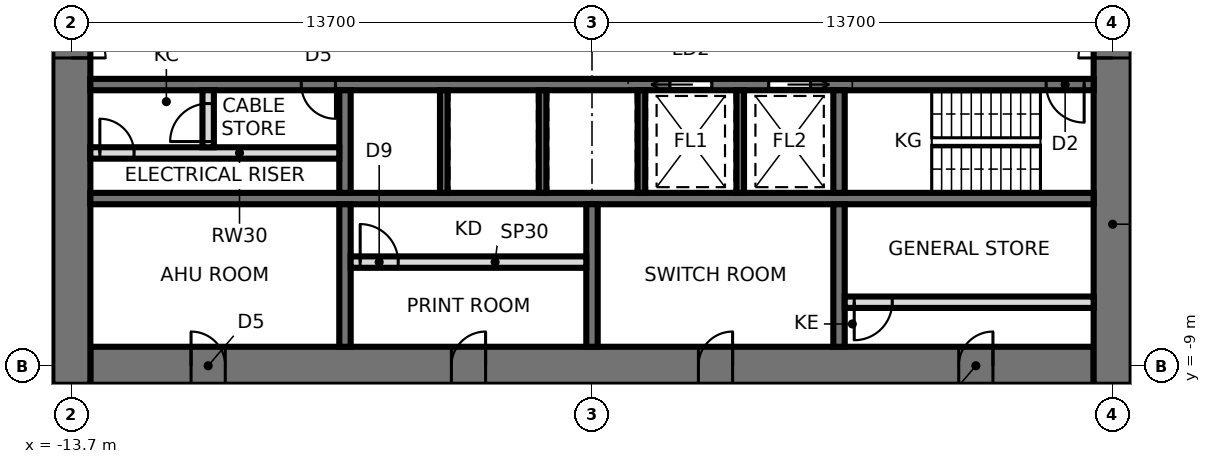
"""IFC4 building model, lengths in metres.
Left out: names, types, materials, properties, quantities, classifications, styles, units other than length and angle.
Written with IfcOpenShell. Run it as: python <this file> out.ifc"""

import sys

from ifc_helpers import new_model, si_unit, direction, frame, frame_2d, origin, place, context, subcontext, project, spatial, rectangle, extrude, element, fill, save


model = new_model("IFC4")
c1 = context("Model", 3, precision=1e-05, world=origin(), true_north=direction((0.0, 1.0)))
c2 = subcontext(c1, "Body", "Model", "MODEL_VIEW")
j1 = project(units=[si_unit("LENGTHUNIT", "METRE"), si_unit("PLANEANGLEUNIT", "RADIAN")], contexts=[c1])
p1 = place(None, origin())
s1 = spatial("IfcSite", under=j1, at=p1, CompositionType="ELEMENT")
p2 = place(p1, origin())
s2 = spatial("IfcBuilding", under=s1, at=p2, CompositionType="ELEMENT")
p3 = place(p2, frame((0.0, 0.0, 44.8)))
s3 = spatial("IfcBuildingStorey", under=s2, at=p3, CompositionType="ELEMENT", Elevation=44.8)
p4 = place(p3, frame((-13.2, -9.0, 0.0), z_axis=(0.0, 0.0, 1.0), x_axis=(1.0, 0.0, 0.0)))
e1 = element("IfcWall", 1, at=p4, inside=s3, PredefinedType="SHEAR", context=c2, shape_type="SweptSolid", body=[
    extrude(rectangle(XDim=26.4, YDim=1.0, at=frame_2d((13.2, 0.0))), origin(), (0.0, 0.0, 1.0), 4.2),
])
p5 = place(p4, frame((2.65, 0.0, 0.0)))
e2 = element("IfcOpeningElement", 2, at=p5, cuts=e1, PredefinedType="OPENING", context=c2, shape_type="SweptSolid", body=[
    extrude(rectangle(XDim=0.9, YDim=2.1, at=frame_2d((0.45, 1.05))), frame((0.0, 0.51, 0.0), z_axis=(0.0, -1.0, 0.0), x_axis=(1.0, 0.0, 0.0)), (0.0, 0.0, 1.0), 1.02),
])
p6 = place(p4, frame((9.5, 0.0, 0.0)))
e3 = element("IfcOpeningElement", 3, at=p6, cuts=e1, PredefinedType="OPENING", context=c2, shape_type="SweptSolid", body=[
    extrude(rectangle(XDim=0.9, YDim=2.1, at=frame_2d((0.45, 1.05))), frame((0.0, 0.51, 0.0), z_axis=(0.0, -1.0, 0.0), x_axis=(1.0, 0.0, 0.0)), (0.0, 0.0, 1.0), 1.02),
])
p7 = place(p4, frame((16.0, 0.0, 0.0)))
e4 = element("IfcOpeningElement", 4, at=p7, cuts=e1, PredefinedType="OPENING", context=c2, shape_type="SweptSolid", body=[
    extrude(rectangle(XDim=0.9, YDim=2.1, at=frame_2d((0.45, 1.05))), frame((0.0, 0.51, 0.0), z_axis=(0.0, -1.0, 0.0), x_axis=(1.0, 0.0, 0.0)), (0.0, 0.0, 1.0), 1.02),
])
p8 = place(p4, frame((22.85, 0.0, 0.0)))
e5 = element("IfcOpeningElement", 5, at=p8, cuts=e1, PredefinedType="OPENING", context=c2, shape_type="SweptSolid", body=[
    extrude(rectangle(XDim=0.9, YDim=2.1, at=frame_2d((0.45, 1.05))), frame((0.0, 0.51, 0.0), z_axis=(0.0, -1.0, 0.0), x_axis=(1.0, 0.0, 0.0)), (0.0, 0.0, 1.0), 1.02),
])
p9 = place(p3, frame((13.7, -9.5, 0.0), z_axis=(0.0, 0.0, 1.0), x_axis=(0.0, 1.0, 0.0)))
e6 = element("IfcWall", 6, at=p9, inside=s3, PredefinedType="SHEAR", context=c2, shape_type="SweptSolid", body=[
    extrude(rectangle(XDim=19.0, YDim=1.0, at=frame_2d((9.5, 0.0))), origin(), (0.0, 0.0, 1.0), 4.2),
])
p10 = place(p9, frame((8.6, 0.0, 0.0)))
e7 = element("IfcOpeningElement", 7, at=p10, cuts=e6, PredefinedType="OPENING", context=c2, shape_type="SweptSolid", body=[
    extrude(rectangle(XDim=1.8, YDim=2.4, at=frame_2d((0.9, 1.2))), frame((0.0, 0.51, 0.0), z_axis=(0.0, -1.0, 0.0), x_axis=(1.0, 0.0, 0.0)), (0.0, 0.0, 1.0), 1.02),
])
p11 = place(p3, frame((-13.7, 9.5, 0.0), z_axis=(0.0, 0.0, 1.0), x_axis=(0.0, -1.0, 0.0)))
e8 = element("IfcWall", 8, at=p11, inside=s3, PredefinedType="SHEAR", context=c2, shape_type="SweptSolid", body=[
    extrude(rectangle(XDim=19.0, YDim=1.0, at=frame_2d((9.5, 0.0))), origin(), (0.0, 0.0, 1.0), 4.2),
])
p12 = place(p11, frame((8.6, 0.0, 0.0)))
e9 = element("IfcOpeningElement", 9, at=p12, cuts=e8, PredefinedType="OPENING", context=c2, shape_type="SweptSolid", body=[
    extrude(rectangle(XDim=1.8, YDim=2.4, at=frame_2d((0.9, 1.2))), frame((0.0, 0.51, 0.0), z_axis=(0.0, -1.0, 0.0), x_axis=(1.0, 0.0, 0.0)), (0.0, 0.0, 1.0), 1.02),
])
p13 = place(p3, frame((-13.2, -1.6, 0.0), z_axis=(0.0, 0.0, 1.0), x_axis=(1.0, 0.0, 0.0)))
e10 = element("IfcWall", 10, at=p13, inside=s3, PredefinedType="SHEAR", context=c2, shape_type="SweptSolid", body=[
    extrude(rectangle(XDim=26.4, YDim=0.3, at=frame_2d((13.2, 0.0))), origin(), (0.0, 0.0, 1.0), 4.2),
])
p14 = place(p13, frame((25.15, 0.0, 0.0)))
e11 = element("IfcOpeningElement", 11, at=p14, cuts=e10, PredefinedType="OPENING", context=c2, shape_type="SweptSolid", body=[
    extrude(rectangle(XDim=1.0, YDim=2.1, at=frame_2d((0.5, 1.05))), frame((0.0, 0.16, 0.0), z_axis=(0.0, -1.0, 0.0), x_axis=(1.0, 0.0, 0.0)), (0.0, 0.0, 1.0), 0.32),
])
p15 = place(p13, frame((15.25, 0.0, 0.0)))
e12 = element("IfcOpeningElement", 12, at=p15, cuts=e10, PredefinedType="OPENING", context=c2, shape_type="SweptSolid", body=[
    extrude(rectangle(XDim=1.1, YDim=2.3, at=frame_2d((0.55, 1.15))), frame((0.0, 0.16, 0.0), z_axis=(0.0, -1.0, 0.0), x_axis=(1.0, 0.0, 0.0)), (0.0, 0.0, 1.0), 0.32),
])
p16 = place(p13, frame((17.85, 0.0, 0.0)))
e13 = element("IfcOpeningElement", 13, at=p16, cuts=e10, PredefinedType="OPENING", context=c2, shape_type="SweptSolid", body=[
    extrude(rectangle(XDim=1.1, YDim=2.3, at=frame_2d((0.55, 1.15))), frame((0.0, 0.16, 0.0), z_axis=(0.0, -1.0, 0.0), x_axis=(1.0, 0.0, 0.0)), (0.0, 0.0, 1.0), 0.32),
])
p17 = place(p13, frame((5.55, 0.0, 0.0)))
e14 = element("IfcOpeningElement", 14, at=p17, cuts=e10, PredefinedType="OPENING", context=c2, shape_type="SweptSolid", body=[
    extrude(rectangle(XDim=0.9, YDim=2.1, at=frame_2d((0.45, 1.05))), frame((0.0, 0.16, 0.0), z_axis=(0.0, -1.0, 0.0), x_axis=(1.0, 0.0, 0.0)), (0.0, 0.0, 1.0), 0.32),
])
p18 = place(p3, frame((-13.2, -4.6, 0.0), z_axis=(0.0, 0.0, 1.0), x_axis=(1.0, 0.0, 0.0)))
e15 = element("IfcWall", 15, at=p18, inside=s3, PredefinedType="SHEAR", context=c2, shape_type="SweptSolid", body=[
    extrude(rectangle(XDim=26.4, YDim=0.3, at=frame_2d((13.2, 0.0))), origin(), (0.0, 0.0, 1.0), 4.2),
])
p19 = place(p3, frame((-6.5, -1.75, 0.0), z_axis=(0.0, 0.0, 1.0), x_axis=(0.0, -1.0, 0.0)))
e16 = element("IfcWall", 16, at=p19, inside=s3, PredefinedType="SHEAR", context=c2, shape_type="SweptSolid", body=[
    extrude(rectangle(XDim=2.7, YDim=0.3, at=frame_2d((1.35, 0.0))), origin(), (0.0, 0.0, 1.0), 4.2),
])
p20 = place(p3, frame((-6.5, -4.75, 0.0), z_axis=(0.0, 0.0, 1.0), x_axis=(0.0, -1.0, 0.0)))
e17 = element("IfcWall", 17, at=p20, inside=s3, PredefinedType="SHEAR", context=c2, shape_type="SweptSolid", body=[
    extrude(rectangle(XDim=3.75, YDim=0.3, at=frame_2d((1.875, 0.0))), origin(), (0.0, 0.0, 1.0), 4.2),
])
p21 = place(p3, frame((6.5, -1.75, 0.0), z_axis=(0.0, 0.0, 1.0), x_axis=(0.0, -1.0, 0.0)))
e18 = element("IfcWall", 18, at=p21, inside=s3, PredefinedType="SHEAR", context=c2, shape_type="SweptSolid", body=[
    extrude(rectangle(XDim=2.7, YDim=0.3, at=frame_2d((1.35, 0.0))), origin(), (0.0, 0.0, 1.0), 4.2),
])
p22 = place(p3, frame((6.5, -4.75, 0.0), z_axis=(0.0, 0.0, 1.0), x_axis=(0.0, -1.0, 0.0)))
e19 = element("IfcWall", 19, at=p22, inside=s3, PredefinedType="SHEAR", context=c2, shape_type="SweptSolid", body=[
    extrude(rectangle(XDim=3.75, YDim=0.3, at=frame_2d((1.875, 0.0))), origin(), (0.0, 0.0, 1.0), 4.2),
])
for number, where, z_axis, x_axis in (
    (20, (-3.9, -1.75, 0.0), (0.0, 0.0, 1.0), (0.0, -1.0, 0.0)),
    (21, (-1.3, -1.75, 0.0), (0.0, 0.0, 1.0), (0.0, -1.0, 0.0)),
    (22, (1.3, -1.75, 0.0), (0.0, 0.0, 1.0), (0.0, -1.0, 0.0)),
    (23, (3.9, -1.75, 0.0), (0.0, 0.0, 1.0), (0.0, -1.0, 0.0)),
):
    element("IfcWall", number, at=place(p3, frame(where, z_axis=z_axis, x_axis=x_axis)), inside=s3, PredefinedType="SHEAR", context=c2, shape_type="SweptSolid", body=[
        extrude(rectangle(XDim=2.7, YDim=0.2, at=frame_2d((1.35, 0.0))), origin(), (0.0, 0.0, 1.0), 4.2),
    ])
p23 = place(p3, frame((0.0, -4.75, 0.0), z_axis=(0.0, 0.0, 1.0), x_axis=(0.0, -1.0, 0.0)))
e24 = element("IfcWall", 24, at=p23, inside=s3, PredefinedType="SHEAR", context=c2, shape_type="SweptSolid", body=[
    extrude(rectangle(XDim=3.75, YDim=0.3, at=frame_2d((1.875, 0.0))), origin(), (0.0, 0.0, 1.0), 4.2),
])
p24 = place(p3, frame((-6.35, -6.272, 0.0), z_axis=(0.0, 0.0, 1.0), x_axis=(1.0, 0.0, 0.0)))
e25 = element("IfcWall", 25, at=p24, inside=s3, PredefinedType="PARTITIONING", context=c2, shape_type="SweptSolid", body=[
    extrude(rectangle(XDim=6.2, YDim=0.3, at=frame_2d((3.1, 0.0))), origin(), (0.0, 0.0, 1.0), 4.04),
])
p25 = place(p24, frame((0.25, 0.0, 0.0)))
e26 = element("IfcOpeningElement", 26, at=p25, cuts=e25, PredefinedType="OPENING", context=c2, shape_type="SweptSolid", body=[
    extrude(rectangle(XDim=1.0, YDim=2.4, at=frame_2d((0.5, 1.2))), frame((0.0, 0.16, 0.0), z_axis=(0.0, -1.0, 0.0), x_axis=(1.0, 0.0, 0.0)), (0.0, 0.0, 1.0), 0.32),
])
p26 = place(p3, frame((6.65, -7.328, 0.0), z_axis=(0.0, 0.0, 1.0), x_axis=(1.0, 0.0, 0.0)))
e27 = element("IfcWall", 27, at=p26, inside=s3, PredefinedType="PARTITIONING", context=c2, shape_type="SweptSolid", body=[
    extrude(rectangle(XDim=6.55, YDim=0.3, at=frame_2d((3.275, 0.0))), origin(), (0.0, 0.0, 1.0), 4.04),
])
p27 = place(p26, frame((0.25, 0.0, 0.0)))
e28 = element("IfcOpeningElement", 28, at=p27, cuts=e27, PredefinedType="OPENING", context=c2, shape_type="SweptSolid", body=[
    extrude(rectangle(XDim=1.0, YDim=2.4, at=frame_2d((0.5, 1.2))), frame((0.0, 0.16, 0.0), z_axis=(0.0, -1.0, 0.0), x_axis=(1.0, 0.0, 0.0)), (0.0, 0.0, 1.0), 0.32),
])
p28 = place(p3, frame((-13.2, -3.4, 0.0), z_axis=(0.0, 0.0, 1.0), x_axis=(1.0, 0.0, 0.0)))
e29 = element("IfcWall", 29, at=p28, inside=s3, PredefinedType="SOLIDWALL", context=c2, shape_type="SweptSolid", body=[
    extrude(rectangle(XDim=6.55, YDim=0.3, at=frame_2d((3.275, 0.0))), origin(), (0.0, 0.0, 1.0), 4.04),
])
p29 = place(p28, frame((0.25, 0.0, 0.0)))
e30 = element("IfcOpeningElement", 30, at=p29, cuts=e29, PredefinedType="OPENING", context=c2, shape_type="SweptSolid", body=[
    extrude(rectangle(XDim=0.9, YDim=2.1, at=frame_2d((0.45, 1.05))), frame((0.0, 0.16, 0.0), z_axis=(0.0, -1.0, 0.0), x_axis=(1.0, 0.0, 0.0)), (0.0, 0.0, 1.0), 0.32),
])
p30 = place(p3, frame((-10.1, -3.25, 0.0), z_axis=(0.0, 0.0, 1.0), x_axis=(0.0, 1.0, 0.0)))
e31 = element("IfcWall", 31, at=p30, inside=s3, PredefinedType="PARTITIONING", context=c2, shape_type="SweptSolid", body=[
    extrude(rectangle(XDim=1.5, YDim=0.3, at=frame_2d((0.75, 0.0))), origin(), (0.0, 0.0, 1.0), 4.04),
])
p31 = place(p30, frame((0.15, 0.0, 0.0)))
e32 = element("IfcOpeningElement", 32, at=p31, cuts=e31, PredefinedType="OPENING", context=c2, shape_type="SweptSolid", body=[
    extrude(rectangle(XDim=1.0, YDim=2.4, at=frame_2d((0.5, 1.2))), frame((0.0, 0.16, 0.0), z_axis=(0.0, -1.0, 0.0), x_axis=(1.0, 0.0, 0.0)), (0.0, 0.0, 1.0), 0.32),
])
p32 = place(p12, origin())
e33 = element("IfcDoor", 33, at=p32, inside=s3, OperationType="DOUBLE_DOOR_SINGLE_SWING", PredefinedType="DOOR", context=c2, shape_type="SweptSolid", body=[
    extrude(rectangle(XDim=1.72, YDim=2.36, at=frame_2d((0.9, 1.18))), frame((0.0, 0.025, 0.0), z_axis=(0.0, -1.0, 0.0), x_axis=(1.0, 0.0, 0.0)), (0.0, 0.0, 1.0), 0.05),
    extrude(rectangle(XDim=0.04, YDim=2.4, at=frame_2d((0.02, 1.2))), frame((0.0, 0.25, 0.0), z_axis=(0.0, -1.0, 0.0), x_axis=(1.0, 0.0, 0.0)), (0.0, 0.0, 1.0), 0.5),
    extrude(rectangle(XDim=0.04, YDim=2.4, at=frame_2d((1.78, 1.2))), frame((0.0, 0.25, 0.0), z_axis=(0.0, -1.0, 0.0), x_axis=(1.0, 0.0, 0.0)), (0.0, 0.0, 1.0), 0.5),
    extrude(rectangle(XDim=1.72, YDim=0.04, at=frame_2d((0.9, 2.38))), frame((0.0, 0.25, 0.0), z_axis=(0.0, -1.0, 0.0), x_axis=(1.0, 0.0, 0.0)), (0.0, 0.0, 1.0), 0.5),
])
fill(e9, e33)
p33 = place(p10, origin())
e34 = element("IfcDoor", 34, at=p33, inside=s3, OperationType="DOUBLE_DOOR_SINGLE_SWING", PredefinedType="DOOR", context=c2, shape_type="SweptSolid", body=[
    extrude(rectangle(XDim=1.72, YDim=2.36, at=frame_2d((0.9, 1.18))), frame((0.0, 0.025, 0.0), z_axis=(0.0, -1.0, 0.0), x_axis=(1.0, 0.0, 0.0)), (0.0, 0.0, 1.0), 0.05),
    extrude(rectangle(XDim=0.04, YDim=2.4, at=frame_2d((0.02, 1.2))), frame((0.0, 0.25, 0.0), z_axis=(0.0, -1.0, 0.0), x_axis=(1.0, 0.0, 0.0)), (0.0, 0.0, 1.0), 0.5),
    extrude(rectangle(XDim=0.04, YDim=2.4, at=frame_2d((1.78, 1.2))), frame((0.0, 0.25, 0.0), z_axis=(0.0, -1.0, 0.0), x_axis=(1.0, 0.0, 0.0)), (0.0, 0.0, 1.0), 0.5),
    extrude(rectangle(XDim=1.72, YDim=0.04, at=frame_2d((0.9, 2.38))), frame((0.0, 0.25, 0.0), z_axis=(0.0, -1.0, 0.0), x_axis=(1.0, 0.0, 0.0)), (0.0, 0.0, 1.0), 0.5),
])
fill(e7, e34)
p34 = place(p14, frame((1.0, 0.0, 0.0), z_axis=(0.0, 0.0, 1.0), x_axis=(-1.0, 0.0, 0.0)))
e35 = element("IfcDoor", 35, at=p34, inside=s3, OperationType="SINGLE_SWING_LEFT", PredefinedType="DOOR", context=c2, shape_type="SweptSolid", body=[
    extrude(rectangle(XDim=1.0, YDim=2.1, at=frame_2d((0.5, 1.05))), frame((0.0, 0.025, 0.0), z_axis=(0.0, -1.0, 0.0), x_axis=(1.0, 0.0, 0.0)), (0.0, 0.0, 1.0), 0.05),
])
fill(e11, e35)
p35 = place(p15, frame((1.1, 0.0, 0.0), z_axis=(0.0, 0.0, 1.0), x_axis=(-1.0, 0.0, 0.0)))
e36 = element("IfcDoor", 36, at=p35, inside=s3, OperationType="SLIDING_TO_RIGHT", PredefinedType="DOOR", context=c2, shape_type="SweptSolid", body=[
    extrude(rectangle(XDim=1.1, YDim=2.3, at=frame_2d((0.55, 1.15))), frame((0.0, 0.025, 0.0), z_axis=(0.0, -1.0, 0.0), x_axis=(1.0, 0.0, 0.0)), (0.0, 0.0, 1.0), 0.05),
])
fill(e12, e36)
p36 = place(p16, frame((1.1, 0.0, 0.0), z_axis=(0.0, 0.0, 1.0), x_axis=(-1.0, 0.0, 0.0)))
e37 = element("IfcDoor", 37, at=p36, inside=s3, OperationType="SLIDING_TO_LEFT", PredefinedType="DOOR", context=c2, shape_type="SweptSolid", body=[
    extrude(rectangle(XDim=1.1, YDim=2.3, at=frame_2d((0.55, 1.15))), frame((0.0, 0.025, 0.0), z_axis=(0.0, -1.0, 0.0), x_axis=(1.0, 0.0, 0.0)), (0.0, 0.0, 1.0), 0.05),
])
fill(e13, e37)
p37 = place(p17, frame((0.9, 0.0, 0.0), z_axis=(0.0, 0.0, 1.0), x_axis=(-1.0, 0.0, 0.0)))
e38 = element("IfcDoor", 38, at=p37, inside=s3, OperationType="SINGLE_SWING_LEFT", PredefinedType="DOOR", context=c2, shape_type="SweptSolid", body=[
    extrude(rectangle(XDim=0.9, YDim=2.1, at=frame_2d((0.45, 1.05))), frame((0.0, 0.025, 0.0), z_axis=(0.0, -1.0, 0.0), x_axis=(1.0, 0.0, 0.0)), (0.0, 0.0, 1.0), 0.05),
])
fill(e14, e38)
p38 = place(p5, origin())
e39 = element("IfcDoor", 39, at=p38, inside=s3, OperationType="SINGLE_SWING_LEFT", PredefinedType="DOOR", context=c2, shape_type="SweptSolid", body=[
    extrude(rectangle(XDim=0.82, YDim=2.06, at=frame_2d((0.45, 1.03))), frame((0.0, 0.025, 0.0), z_axis=(0.0, -1.0, 0.0), x_axis=(1.0, 0.0, 0.0)), (0.0, 0.0, 1.0), 0.05),
    extrude(rectangle(XDim=0.04, YDim=2.1, at=frame_2d((0.02, 1.05))), frame((0.0, 0.25, 0.0), z_axis=(0.0, -1.0, 0.0), x_axis=(1.0, 0.0, 0.0)), (0.0, 0.0, 1.0), 0.5),
    extrude(rectangle(XDim=0.04, YDim=2.1, at=frame_2d((0.88, 1.05))), frame((0.0, 0.25, 0.0), z_axis=(0.0, -1.0, 0.0), x_axis=(1.0, 0.0, 0.0)), (0.0, 0.0, 1.0), 0.5),
    extrude(rectangle(XDim=0.82, YDim=0.04, at=frame_2d((0.45, 2.08))), frame((0.0, 0.25, 0.0), z_axis=(0.0, -1.0, 0.0), x_axis=(1.0, 0.0, 0.0)), (0.0, 0.0, 1.0), 0.5),
])
fill(e2, e39)
p39 = place(p6, origin())
e40 = element("IfcDoor", 40, at=p39, inside=s3, OperationType="SINGLE_SWING_RIGHT", PredefinedType="DOOR", context=c2, shape_type="SweptSolid", body=[
    extrude(rectangle(XDim=0.82, YDim=2.06, at=frame_2d((0.45, 1.03))), frame((0.0, 0.025, 0.0), z_axis=(0.0, -1.0, 0.0), x_axis=(1.0, 0.0, 0.0)), (0.0, 0.0, 1.0), 0.05),
    extrude(rectangle(XDim=0.04, YDim=2.1, at=frame_2d((0.02, 1.05))), frame((0.0, 0.25, 0.0), z_axis=(0.0, -1.0, 0.0), x_axis=(1.0, 0.0, 0.0)), (0.0, 0.0, 1.0), 0.5),
    extrude(rectangle(XDim=0.04, YDim=2.1, at=frame_2d((0.88, 1.05))), frame((0.0, 0.25, 0.0), z_axis=(0.0, -1.0, 0.0), x_axis=(1.0, 0.0, 0.0)), (0.0, 0.0, 1.0), 0.5),
    extrude(rectangle(XDim=0.82, YDim=0.04, at=frame_2d((0.45, 2.08))), frame((0.0, 0.25, 0.0), z_axis=(0.0, -1.0, 0.0), x_axis=(1.0, 0.0, 0.0)), (0.0, 0.0, 1.0), 0.5),
])
fill(e3, e40)
p40 = place(p7, origin())
e41 = element("IfcDoor", 41, at=p40, inside=s3, OperationType="SINGLE_SWING_RIGHT", PredefinedType="DOOR", context=c2, shape_type="SweptSolid", body=[
    extrude(rectangle(XDim=0.82, YDim=2.06, at=frame_2d((0.45, 1.03))), frame((0.0, 0.025, 0.0), z_axis=(0.0, -1.0, 0.0), x_axis=(1.0, 0.0, 0.0)), (0.0, 0.0, 1.0), 0.05),
    extrude(rectangle(XDim=0.04, YDim=2.1, at=frame_2d((0.02, 1.05))), frame((0.0, 0.25, 0.0), z_axis=(0.0, -1.0, 0.0), x_axis=(1.0, 0.0, 0.0)), (0.0, 0.0, 1.0), 0.5),
    extrude(rectangle(XDim=0.04, YDim=2.1, at=frame_2d((0.88, 1.05))), frame((0.0, 0.25, 0.0), z_axis=(0.0, -1.0, 0.0), x_axis=(1.0, 0.0, 0.0)), (0.0, 0.0, 1.0), 0.5),
    extrude(rectangle(XDim=0.82, YDim=0.04, at=frame_2d((0.45, 2.08))), frame((0.0, 0.25, 0.0), z_axis=(0.0, -1.0, 0.0), x_axis=(1.0, 0.0, 0.0)), (0.0, 0.0, 1.0), 0.5),
])
fill(e4, e41)
p41 = place(p8, origin())
e42 = element("IfcDoor", 42, at=p41, inside=s3, OperationType="SINGLE_SWING_RIGHT", PredefinedType="DOOR", context=c2, shape_type="SweptSolid", body=[
    extrude(rectangle(XDim=0.82, YDim=2.06, at=frame_2d((0.45, 1.03))), frame((0.0, 0.025, 0.0), z_axis=(0.0, -1.0, 0.0), x_axis=(1.0, 0.0, 0.0)), (0.0, 0.0, 1.0), 0.05),
    extrude(rectangle(XDim=0.04, YDim=2.1, at=frame_2d((0.02, 1.05))), frame((0.0, 0.25, 0.0), z_axis=(0.0, -1.0, 0.0), x_axis=(1.0, 0.0, 0.0)), (0.0, 0.0, 1.0), 0.5),
    extrude(rectangle(XDim=0.04, YDim=2.1, at=frame_2d((0.88, 1.05))), frame((0.0, 0.25, 0.0), z_axis=(0.0, -1.0, 0.0), x_axis=(1.0, 0.0, 0.0)), (0.0, 0.0, 1.0), 0.5),
    extrude(rectangle(XDim=0.82, YDim=0.04, at=frame_2d((0.45, 2.08))), frame((0.0, 0.25, 0.0), z_axis=(0.0, -1.0, 0.0), x_axis=(1.0, 0.0, 0.0)), (0.0, 0.0, 1.0), 0.5),
])
fill(e5, e42)
p42 = place(p25, origin())
e43 = element("IfcDoor", 43, at=p42, inside=s3, OperationType="SINGLE_SWING_LEFT", PredefinedType="DOOR", context=c2, shape_type="SweptSolid", body=[
    extrude(rectangle(XDim=1.0, YDim=2.4, at=frame_2d((0.5, 1.2))), frame((0.0, 0.025, 0.0), z_axis=(0.0, -1.0, 0.0), x_axis=(1.0, 0.0, 0.0)), (0.0, 0.0, 1.0), 0.05),
])
fill(e26, e43)
p43 = place(p27, frame((1.0, 0.0, 0.0), z_axis=(0.0, 0.0, 1.0), x_axis=(-1.0, 0.0, 0.0)))
e44 = element("IfcDoor", 44, at=p43, inside=s3, OperationType="SINGLE_SWING_RIGHT", PredefinedType="DOOR", context=c2, shape_type="SweptSolid", body=[
    extrude(rectangle(XDim=1.0, YDim=2.4, at=frame_2d((0.5, 1.2))), frame((0.0, 0.025, 0.0), z_axis=(0.0, -1.0, 0.0), x_axis=(1.0, 0.0, 0.0)), (0.0, 0.0, 1.0), 0.05),
])
fill(e28, e44)
p44 = place(p29, origin())
e45 = element("IfcDoor", 45, at=p44, inside=s3, OperationType="SINGLE_SWING_LEFT", PredefinedType="DOOR", context=c2, shape_type="SweptSolid", body=[
    extrude(rectangle(XDim=0.9, YDim=2.1, at=frame_2d((0.45, 1.05))), frame((0.0, 0.025, 0.0), z_axis=(0.0, -1.0, 0.0), x_axis=(1.0, 0.0, 0.0)), (0.0, 0.0, 1.0), 0.05),
])
fill(e30, e45)
p45 = place(p31, origin())
e46 = element("IfcDoor", 46, at=p45, inside=s3, OperationType="SINGLE_SWING_LEFT", PredefinedType="DOOR", context=c2, shape_type="SweptSolid", body=[
    extrude(rectangle(XDim=1.0, YDim=2.4, at=frame_2d((0.5, 1.2))), frame((0.0, 0.025, 0.0), z_axis=(0.0, -1.0, 0.0), x_axis=(1.0, 0.0, 0.0)), (0.0, 0.0, 1.0), 0.05),
])
fill(e32, e46)
save(model, sys.argv[1])
